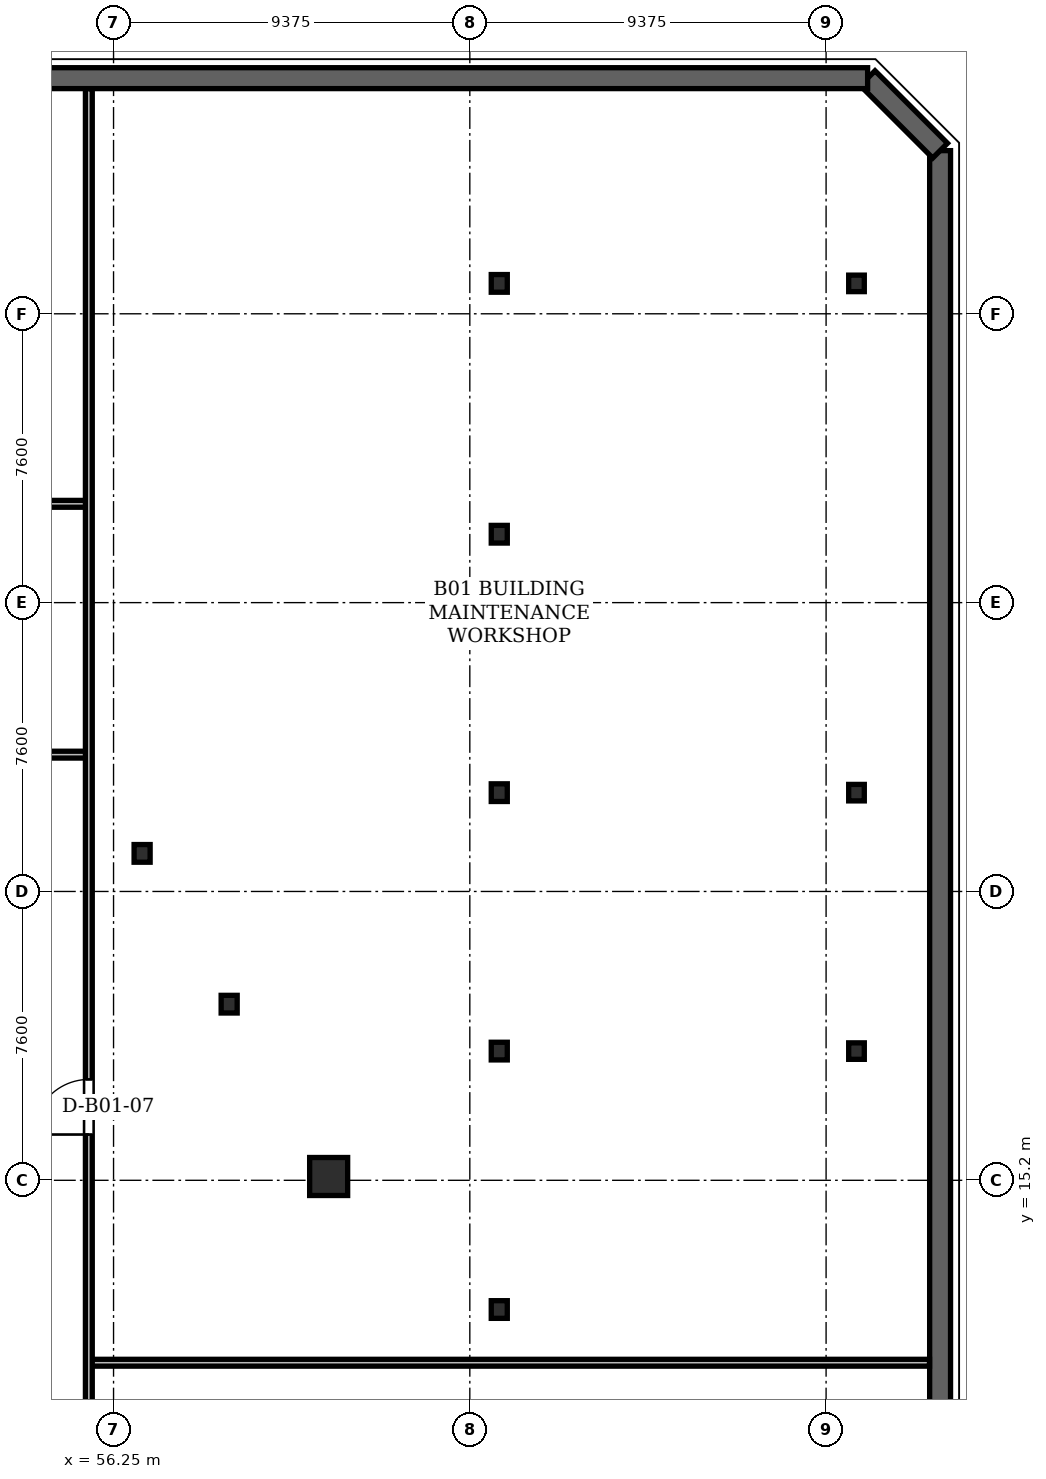
"""IFC4 building model, lengths in metres.
Left out: names, types, materials, properties, quantities, classifications, styles, units other than length and angle.
Written with IfcOpenShell. Run it as: python <this file> out.ifc"""

import sys

from ifc_helpers import new_model, si_unit, direction, frame, frame_2d, origin, origin_2d, place, context, subcontext, project, spatial, rectangle, hollow_rectangle, i_section, extrude, element, fill, save


model = new_model("IFC4")
c1 = context("Model", 3, precision=1e-05, world=origin(), true_north=direction((0.0, 1.0)))
c2 = subcontext(c1, "Body", "Model", "MODEL_VIEW")
j1 = project(units=[si_unit("LENGTHUNIT", "METRE"), si_unit("PLANEANGLEUNIT", "RADIAN")], contexts=[c1])
p1 = place(None, origin())
s1 = spatial("IfcSite", under=j1, at=p1, CompositionType="ELEMENT")
p2 = place(p1, origin())
s2 = spatial("IfcBuilding", under=s1, at=p2, CompositionType="ELEMENT")
p3 = place(p2, frame((0.0, 0.0, -4.0)))
s3 = spatial("IfcBuildingStorey", under=s2, at=p3, CompositionType="ELEMENT", Elevation=-4.0)
p4 = place(p3, frame((61.91, 15.3, 0.004), z_axis=(0.0, 0.0, 1.0), x_axis=(1.0, 0.0, 0.0)))
e1 = element("IfcColumn", 1, at=p4, inside=s3, PredefinedType="COLUMN", context=c2, shape_type="SweptSolid", body=[
    extrude(hollow_rectangle(XDim=1.0, YDim=1.0, WallThickness=0.085, at=origin_2d()), origin(), (0.0, 0.0, 1.0), 3.991),
])
for number, where, z_axis, x_axis in (
    (2, (59.292, 19.834, 0.004), (0.0, 0.0, 1.0), (1.0, 0.0, 0.0)),
    (3, (57.002, 23.802, 0.004), (0.0, 0.0, 1.0), (1.0, 0.0, 0.0)),
):
    element("IfcColumn", number, at=place(p3, frame(where, z_axis=z_axis, x_axis=x_axis)), inside=s3, PredefinedType="COLUMN", context=c2, shape_type="SweptSolid", body=[
        extrude(i_section(OverallWidth=0.422, OverallDepth=0.465, WebThickness=0.045, FlangeThickness=0.072, at=origin_2d()), origin(), (0.0, 0.0, 1.0), 3.991),
    ])
for number, where, z_axis, x_axis in (
    (4, (66.4, 11.8, 0.0), (0.0, 0.0, 1.0), (1.0, 0.0, 0.0)),
    (5, (66.4, 18.6, 0.0), (0.0, 0.0, 1.0), (1.0, 0.0, 0.0)),
    (6, (66.4, 25.4, 0.0), (0.0, 0.0, 1.0), (1.0, 0.0, 0.0)),
    (7, (66.4, 32.2, 0.0), (0.0, 0.0, 1.0), (1.0, 0.0, 0.0)),
    (8, (66.4, 38.8, 0.0), (0.0, 0.0, 1.0), (1.0, 0.0, 0.0)),
):
    element("IfcColumn", number, at=place(p3, frame(where, z_axis=z_axis, x_axis=x_axis)), inside=s3, PredefinedType="COLUMN", context=c2, shape_type="SweptSolid", body=[
        extrude(i_section(OverallWidth=0.422, OverallDepth=0.465, WebThickness=0.045, FlangeThickness=0.072, at=origin_2d()), origin(), (0.0, 0.0, 1.0), 4.0),
    ])
for number, where, z_axis, x_axis in (
    (9, (75.8, 18.6, 0.0), (0.0, 0.0, 1.0), (1.0, 0.0, 0.0)),
    (10, (75.8, 25.4, 0.0), (0.0, 0.0, 1.0), (1.0, 0.0, 0.0)),
    (11, (75.8, 38.8, 0.0), (0.0, 0.0, 1.0), (1.0, 0.0, 0.0)),
):
    element("IfcColumn", number, at=place(p3, frame(where, z_axis=z_axis, x_axis=x_axis)), inside=s3, PredefinedType="COLUMN", context=c2, shape_type="SweptSolid", body=[
        extrude(i_section(OverallWidth=0.411, OverallDepth=0.434, WebThickness=0.036, FlangeThickness=0.057, at=origin_2d()), origin(), (0.0, 0.0, 1.0), 4.0),
    ])
p5 = place(p3, frame((78.0, 3.307, 0.0), z_axis=(0.0, 0.0, 1.0), x_axis=(0.0, 1.0, 0.0)))
e12 = element("IfcWall", 12, at=p5, inside=s3, PredefinedType="USERDEFINED", context=c2, shape_type="SweptSolid", body=[
    extrude(rectangle(XDim=38.986, YDim=0.55, at=frame_2d((19.493, 0.0))), origin(), (0.0, 0.0, 1.0), 3.68),
])
p6 = place(p3, frame((78.0, 42.293, 0.0), z_axis=(0.0, 0.0, 1.0), x_axis=(-0.707106781187, 0.707106781187, 0.0)))
e13 = element("IfcWall", 13, at=p6, inside=s3, PredefinedType="USERDEFINED", context=c2, shape_type="SweptSolid", body=[
    extrude(rectangle(XDim=2.697, YDim=0.55, at=frame_2d((1.348, 0.0))), origin(), (0.0, 0.0, 1.0), 3.68),
])
p7 = place(p3, frame((76.093, 44.2, 0.0), z_axis=(0.0, 0.0, 1.0), x_axis=(-1.0, 0.0, 0.0)))
e14 = element("IfcWall", 14, at=p7, inside=s3, PredefinedType="USERDEFINED", context=c2, shape_type="SweptSolid", body=[
    extrude(rectangle(XDim=77.186, YDim=0.55, at=frame_2d((38.593, 0.0))), origin(), (0.0, 0.0, 1.0), 3.68),
])
p8 = place(p3, frame((55.6, 10.4, 0.0), z_axis=(0.0, 0.0, 1.0), x_axis=(1.0, 0.0, 0.0)))
e15 = element("IfcWall", 15, at=p8, inside=s3, PredefinedType="PARTITIONING", context=c2, shape_type="SweptSolid", body=[
    extrude(rectangle(XDim=22.121, YDim=0.18, at=frame_2d((11.061, 0.0))), origin(), (0.0, 0.0, 1.0), 2.743),
])
p9 = place(p3, frame((27.05, 26.4, 0.0), z_axis=(0.0, 0.0, 1.0), x_axis=(1.0, 0.0, 0.0)))
e16 = element("IfcWall", 16, at=p9, inside=s3, PredefinedType="PARTITIONING", context=c2, shape_type="SweptSolid", body=[
    extrude(rectangle(XDim=28.55, YDim=0.18, at=frame_2d((14.275, 0.0))), origin(), (0.0, 0.0, 1.0), 2.743),
])
p10 = place(p9, frame((8.752, 0.0, 0.0)))
e17 = element("IfcOpeningElement", 17, at=p10, cuts=e16, PredefinedType="OPENING", context=c2, shape_type="SweptSolid", body=[
    extrude(rectangle(XDim=1.45, YDim=2.25, at=frame_2d((0.725, 1.125))), frame((0.0, 0.09, 0.0), z_axis=(0.0, -1.0, 0.0), x_axis=(1.0, 0.0, 0.0)), (0.0, 0.0, 1.0), 0.18),
])
p11 = place(p9, frame((21.538, 0.0, 0.0)))
e18 = element("IfcOpeningElement", 18, at=p11, cuts=e16, PredefinedType="OPENING", context=c2, shape_type="SweptSolid", body=[
    extrude(rectangle(XDim=0.88, YDim=2.08, at=frame_2d((0.44, 1.04))), frame((0.0, 0.09, 0.0), z_axis=(0.0, -1.0, 0.0), x_axis=(1.0, 0.0, 0.0)), (0.0, 0.0, 1.0), 0.18),
])
p12 = place(p9, frame((25.884, 0.0, 0.0)))
e19 = element("IfcOpeningElement", 19, at=p12, cuts=e16, PredefinedType="OPENING", context=c2, shape_type="SweptSolid", body=[
    extrude(rectangle(XDim=0.88, YDim=2.08, at=frame_2d((0.44, 1.04))), frame((0.0, 0.09, 0.0), z_axis=(0.0, -1.0, 0.0), x_axis=(1.0, 0.0, 0.0)), (0.0, 0.0, 1.0), 0.18),
])
p13 = place(p3, frame((47.0, 33.0, 0.0), z_axis=(0.0, 0.0, 1.0), x_axis=(1.0, 0.0, 0.0)))
e20 = element("IfcWall", 20, at=p13, inside=s3, PredefinedType="PARTITIONING", context=c2, shape_type="SweptSolid", body=[
    extrude(rectangle(XDim=8.6, YDim=0.18, at=frame_2d((4.3, 0.0))), origin(), (0.0, 0.0, 1.0), 2.814),
])
p14 = place(p3, frame((55.6, 1.679, 0.0), z_axis=(0.0, 0.0, 1.0), x_axis=(0.0, 1.0, 0.0)))
e21 = element("IfcWall", 21, at=p14, inside=s3, PredefinedType="PARTITIONING", context=c2, shape_type="SweptSolid", body=[
    extrude(rectangle(XDim=42.242, YDim=0.18, at=frame_2d((21.121, 0.0))), origin(), (0.0, 0.0, 1.0), 2.47),
])
p15 = place(p14, frame((14.725, 0.0, 0.0)))
e22 = element("IfcOpeningElement", 22, at=p15, cuts=e21, PredefinedType="OPENING", context=c2, shape_type="SweptSolid", body=[
    extrude(rectangle(XDim=1.45, YDim=2.25, at=frame_2d((0.725, 1.125))), frame((0.0, 0.09, 0.0), z_axis=(0.0, -1.0, 0.0), x_axis=(1.0, 0.0, 0.0)), (0.0, 0.0, 1.0), 0.18),
])
p16 = place(p15, origin())
e23 = element("IfcDoor", 23, at=p16, inside=s3, OperationType="SINGLE_SWING_LEFT", PredefinedType="DOOR", context=c2, shape_type="SweptSolid", body=[
    extrude(rectangle(XDim=1.45, YDim=2.25, at=frame_2d((0.725, 1.125))), frame((0.0, 0.025, 0.0), z_axis=(0.0, -1.0, 0.0), x_axis=(1.0, 0.0, 0.0)), (0.0, 0.0, 1.0), 0.05),
])
fill(e22, e23)
save(model, sys.argv[1])
